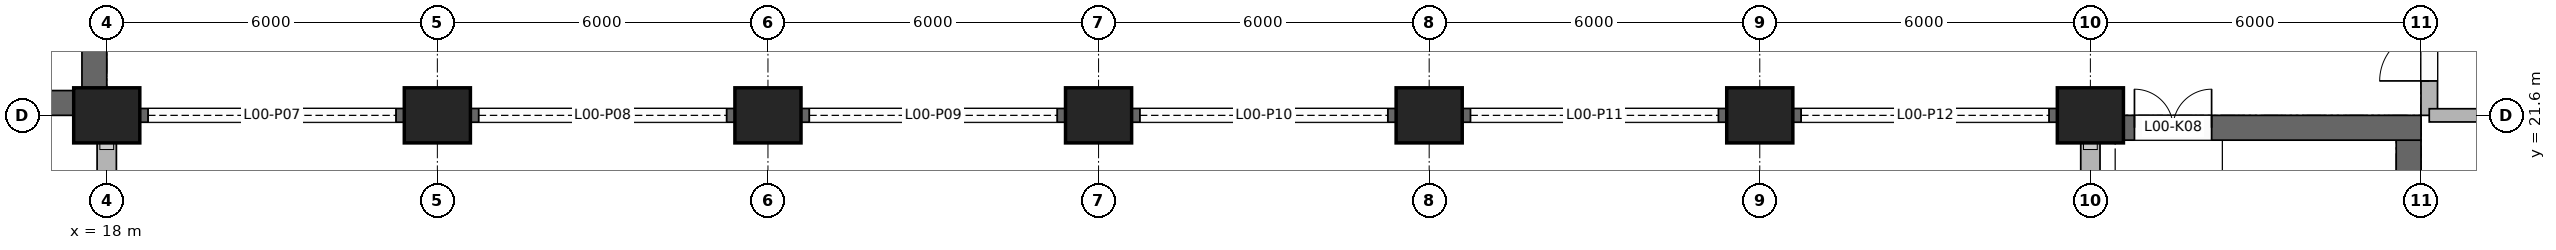
"""IFC4 building model, lengths in metres.
Left out: names, types, materials, properties, quantities, classifications, styles, units other than length and angle.
Written with IfcOpenShell. Run it as: python <this file> out.ifc"""

import sys

from ifc_helpers import new_model, si_unit, direction, frame, frame_2d, origin, origin_2d, place, context, subcontext, project, spatial, rectangle, extrude, element, fill, save


model = new_model("IFC4")
c1 = context("Model", 3, precision=1e-05, world=origin(), true_north=direction((0.0, 1.0)))
c2 = subcontext(c1, "Body", "Model", "MODEL_VIEW")
j1 = project(units=[si_unit("LENGTHUNIT", "METRE"), si_unit("PLANEANGLEUNIT", "RADIAN")], contexts=[c1])
p1 = place(None, origin())
s1 = spatial("IfcSite", under=j1, at=p1, CompositionType="ELEMENT")
p2 = place(p1, origin())
s2 = spatial("IfcBuilding", under=s1, at=p2, CompositionType="ELEMENT")
p3 = place(p2, origin())
s3 = spatial("IfcBuildingStorey", under=s2, at=p3, CompositionType="ELEMENT", Elevation=0.0)
p4 = place(p3, frame((54.6, 21.375, 0.0), z_axis=(0.0, 0.0, 1.0), x_axis=(1.0, 0.0, 0.0)))
e1 = element("IfcWall", 1, at=p4, inside=s3, PredefinedType="SHEAR", context=c2, shape_type="SweptSolid", body=[
    extrude(rectangle(XDim=5.4, YDim=0.45, at=frame_2d((2.7, 0.0))), origin(), (0.0, 0.0, 1.0), 4.0),
])
p5 = place(p4, frame((0.2, 0.0, 0.0)))
e2 = element("IfcOpeningElement", 2, at=p5, cuts=e1, PredefinedType="OPENING", context=c2, shape_type="SweptSolid", body=[
    extrude(rectangle(XDim=1.4, YDim=2.1, at=frame_2d((0.7, 1.05))), frame((0.0, 0.235, 0.0), z_axis=(0.0, -1.0, 0.0), x_axis=(1.0, 0.0, 0.0)), (0.0, 0.0, 1.0), 0.47),
])
p6 = place(p3, frame((59.775, 14.85, 0.0), z_axis=(0.0, 0.0, 1.0), x_axis=(0.0, 1.0, 0.0)))
e3 = element("IfcWall", 3, at=p6, inside=s3, PredefinedType="SHEAR", context=c2, shape_type="SweptSolid", body=[
    extrude(rectangle(XDim=6.3, YDim=0.45, at=frame_2d((3.15, 0.0))), origin(), (0.0, 0.0, 1.0), 4.0),
])
p7 = place(p3, frame((12.0, 21.825, 0.0), z_axis=(0.0, 0.0, 1.0), x_axis=(1.0, 0.0, 0.0)))
e4 = element("IfcWall", 4, at=p7, inside=s3, PredefinedType="SHEAR", context=c2, shape_type="SweptSolid", body=[
    extrude(rectangle(XDim=5.4, YDim=0.45, at=frame_2d((2.7, 0.0))), origin(), (0.0, 0.0, 1.0), 4.0),
])
p8 = place(p7, frame((0.5, 0.0, 0.0)))
e5 = element("IfcOpeningElement", 5, at=p8, cuts=e4, PredefinedType="OPENING", context=c2, shape_type="SweptSolid", body=[
    extrude(rectangle(XDim=1.2, YDim=2.1, at=frame_2d((0.6, 1.05))), frame((0.0, 0.235, 0.0), z_axis=(0.0, -1.0, 0.0), x_axis=(1.0, 0.0, 0.0)), (0.0, 0.0, 1.0), 0.47),
])
p9 = place(p3, frame((17.775, 22.1, 0.0), z_axis=(0.0, 0.0, 1.0), x_axis=(0.0, 1.0, 0.0)))
e6 = element("IfcWall", 6, at=p9, inside=s3, PredefinedType="SHEAR", context=c2, shape_type="SweptSolid", body=[
    extrude(rectangle(XDim=6.25, YDim=0.45, at=frame_2d((3.125, 0.0))), origin(), (0.0, 0.0, 1.0), 4.0),
])
for number, where, z_axis, x_axis in (
    (7, (18.0, 21.6, -0.25), (0.0, 0.0, 1.0), (1.0, 0.0, 0.0)),
    (8, (24.0, 21.6, -0.25), (0.0, 0.0, 1.0), (1.0, 0.0, 0.0)),
    (9, (30.0, 21.6, -0.25), (0.0, 0.0, 1.0), (1.0, 0.0, 0.0)),
    (10, (36.0, 21.6, -0.25), (0.0, 0.0, 1.0), (1.0, 0.0, 0.0)),
    (11, (42.0, 21.6, -0.25), (0.0, 0.0, 1.0), (1.0, 0.0, 0.0)),
    (12, (48.0, 21.6, -0.25), (0.0, 0.0, 1.0), (1.0, 0.0, 0.0)),
    (13, (54.0, 21.6, -0.25), (0.0, 0.0, 1.0), (1.0, 0.0, 0.0)),
):
    element("IfcColumn", number, at=place(p3, frame(where, z_axis=z_axis, x_axis=x_axis)), inside=s3, PredefinedType="COLUMN", context=c2, shape_type="SweptSolid", body=[
        extrude(rectangle(XDim=1.2, YDim=1.0, at=origin_2d()), origin(), (0.0, 0.0, 1.0), 4.45),
    ])
p10 = place(p3, frame((18.0, 14.9, 0.0), z_axis=(0.0, 0.0, 1.0), x_axis=(0.0, 1.0, 0.0)))
e14 = element("IfcWall", 14, at=p10, inside=s3, PredefinedType="SOLIDWALL", context=c2, shape_type="SweptSolid", body=[
    extrude(rectangle(XDim=6.2, YDim=0.35, at=frame_2d((3.1, 0.0))), origin(), (0.0, 0.0, 1.0), 4.2),
])
p11 = place(p10, frame((0.1, 0.0, 0.0)))
e15 = element("IfcOpeningElement", 15, at=p11, cuts=e14, PredefinedType="OPENING", context=c2, shape_type="SweptSolid", body=[
    extrude(rectangle(XDim=1.4, YDim=2.1, at=frame_2d((0.7, 1.05))), frame((0.0, 0.185, 0.0), z_axis=(0.0, -1.0, 0.0), x_axis=(1.0, 0.0, 0.0)), (0.0, 0.0, 1.0), 0.37),
])
p12 = place(p3, frame((54.0, 14.9, 0.0), z_axis=(0.0, 0.0, 1.0), x_axis=(0.0, 1.0, 0.0)))
e16 = element("IfcWall", 16, at=p12, inside=s3, PredefinedType="SOLIDWALL", context=c2, shape_type="SweptSolid", body=[
    extrude(rectangle(XDim=6.2, YDim=0.35, at=frame_2d((3.1, 0.0))), origin(), (0.0, 0.0, 1.0), 4.2),
])
p13 = place(p12, frame((0.1, 0.0, 0.0)))
e17 = element("IfcOpeningElement", 17, at=p13, cuts=e16, PredefinedType="OPENING", context=c2, shape_type="SweptSolid", body=[
    extrude(rectangle(XDim=1.4, YDim=2.1, at=frame_2d((0.7, 1.05))), frame((0.0, 0.185, 0.0), z_axis=(0.0, -1.0, 0.0), x_axis=(1.0, 0.0, 0.0)), (0.0, 0.0, 1.0), 0.37),
])
p14 = place(p3, frame((18.6, 21.6, 0.0), z_axis=(0.0, 0.0, 1.0), x_axis=(1.0, 0.0, 0.0)))
e18 = element("IfcWall", 18, at=p14, inside=s3, PredefinedType="SOLIDWALL", context=c2, shape_type="SweptSolid", body=[
    extrude(rectangle(XDim=4.8, YDim=0.25, at=frame_2d((2.4, 0.0))), origin(), (0.0, 0.0, 1.0), 5.4),
])
p15 = place(p14, frame((0.15, 0.0, 0.0)))
e19 = element("IfcOpeningElement", 19, at=p15, cuts=e18, PredefinedType="OPENING", context=c2, shape_type="SweptSolid", body=[
    extrude(rectangle(XDim=4.5, YDim=4.8, at=frame_2d((2.25, 2.4))), frame((0.0, 0.135, 0.0), z_axis=(0.0, -1.0, 0.0), x_axis=(1.0, 0.0, 0.0)), (0.0, 0.0, 1.0), 0.27),
])
p16 = place(p3, frame((24.6, 21.6, 0.0), z_axis=(0.0, 0.0, 1.0), x_axis=(1.0, 0.0, 0.0)))
e20 = element("IfcWall", 20, at=p16, inside=s3, PredefinedType="SOLIDWALL", context=c2, shape_type="SweptSolid", body=[
    extrude(rectangle(XDim=4.8, YDim=0.25, at=frame_2d((2.4, 0.0))), origin(), (0.0, 0.0, 1.0), 5.4),
])
p17 = place(p16, frame((0.15, 0.0, 0.0)))
e21 = element("IfcOpeningElement", 21, at=p17, cuts=e20, PredefinedType="OPENING", context=c2, shape_type="SweptSolid", body=[
    extrude(rectangle(XDim=4.5, YDim=4.8, at=frame_2d((2.25, 2.4))), frame((0.0, 0.135, 0.0), z_axis=(0.0, -1.0, 0.0), x_axis=(1.0, 0.0, 0.0)), (0.0, 0.0, 1.0), 0.27),
])
p18 = place(p3, frame((30.6, 21.6, 0.0), z_axis=(0.0, 0.0, 1.0), x_axis=(1.0, 0.0, 0.0)))
e22 = element("IfcWall", 22, at=p18, inside=s3, PredefinedType="SOLIDWALL", context=c2, shape_type="SweptSolid", body=[
    extrude(rectangle(XDim=4.8, YDim=0.25, at=frame_2d((2.4, 0.0))), origin(), (0.0, 0.0, 1.0), 5.4),
])
p19 = place(p18, frame((0.15, 0.0, 0.0)))
e23 = element("IfcOpeningElement", 23, at=p19, cuts=e22, PredefinedType="OPENING", context=c2, shape_type="SweptSolid", body=[
    extrude(rectangle(XDim=4.5, YDim=4.8, at=frame_2d((2.25, 2.4))), frame((0.0, 0.135, 0.0), z_axis=(0.0, -1.0, 0.0), x_axis=(1.0, 0.0, 0.0)), (0.0, 0.0, 1.0), 0.27),
])
p20 = place(p3, frame((36.6, 21.6, 0.0), z_axis=(0.0, 0.0, 1.0), x_axis=(1.0, 0.0, 0.0)))
e24 = element("IfcWall", 24, at=p20, inside=s3, PredefinedType="SOLIDWALL", context=c2, shape_type="SweptSolid", body=[
    extrude(rectangle(XDim=4.8, YDim=0.25, at=frame_2d((2.4, 0.0))), origin(), (0.0, 0.0, 1.0), 5.4),
])
p21 = place(p20, frame((0.15, 0.0, 0.0)))
e25 = element("IfcOpeningElement", 25, at=p21, cuts=e24, PredefinedType="OPENING", context=c2, shape_type="SweptSolid", body=[
    extrude(rectangle(XDim=4.5, YDim=4.8, at=frame_2d((2.25, 2.4))), frame((0.0, 0.135, 0.0), z_axis=(0.0, -1.0, 0.0), x_axis=(1.0, 0.0, 0.0)), (0.0, 0.0, 1.0), 0.27),
])
p22 = place(p3, frame((42.6, 21.6, 0.0), z_axis=(0.0, 0.0, 1.0), x_axis=(1.0, 0.0, 0.0)))
e26 = element("IfcWall", 26, at=p22, inside=s3, PredefinedType="SOLIDWALL", context=c2, shape_type="SweptSolid", body=[
    extrude(rectangle(XDim=4.8, YDim=0.25, at=frame_2d((2.4, 0.0))), origin(), (0.0, 0.0, 1.0), 5.4),
])
p23 = place(p22, frame((0.15, 0.0, 0.0)))
e27 = element("IfcOpeningElement", 27, at=p23, cuts=e26, PredefinedType="OPENING", context=c2, shape_type="SweptSolid", body=[
    extrude(rectangle(XDim=4.5, YDim=4.8, at=frame_2d((2.25, 2.4))), frame((0.0, 0.135, 0.0), z_axis=(0.0, -1.0, 0.0), x_axis=(1.0, 0.0, 0.0)), (0.0, 0.0, 1.0), 0.27),
])
p24 = place(p3, frame((48.6, 21.6, 0.0), z_axis=(0.0, 0.0, 1.0), x_axis=(1.0, 0.0, 0.0)))
e28 = element("IfcWall", 28, at=p24, inside=s3, PredefinedType="SOLIDWALL", context=c2, shape_type="SweptSolid", body=[
    extrude(rectangle(XDim=4.8, YDim=0.25, at=frame_2d((2.4, 0.0))), origin(), (0.0, 0.0, 1.0), 5.4),
])
p25 = place(p24, frame((0.15, 0.0, 0.0)))
e29 = element("IfcOpeningElement", 29, at=p25, cuts=e28, PredefinedType="OPENING", context=c2, shape_type="SweptSolid", body=[
    extrude(rectangle(XDim=4.5, YDim=4.8, at=frame_2d((2.25, 2.4))), frame((0.0, 0.135, 0.0), z_axis=(0.0, -1.0, 0.0), x_axis=(1.0, 0.0, 0.0)), (0.0, 0.0, 1.0), 0.27),
])
p26 = place(p3, frame((60.15, 21.6, 0.0), z_axis=(0.0, 0.0, 1.0), x_axis=(0.0, 1.0, 0.0)))
e30 = element("IfcWall", 30, at=p26, inside=s3, PredefinedType="SOLIDWALL", context=c2, shape_type="SweptSolid", body=[
    extrude(rectangle(XDim=6.1, YDim=0.3, at=frame_2d((3.05, 0.0))), origin(), (0.0, 0.0, 1.0), 3.2),
])
p27 = place(p26, frame((0.625, 0.0, 0.0)))
e31 = element("IfcOpeningElement", 31, at=p27, cuts=e30, PredefinedType="OPENING", context=c2, shape_type="SweptSolid", body=[
    extrude(rectangle(XDim=1.8, YDim=2.4, at=frame_2d((0.9, 1.2))), frame((0.0, 0.16, 0.0), z_axis=(0.0, -1.0, 0.0), x_axis=(1.0, 0.0, 0.0)), (0.0, 0.0, 1.0), 0.32),
])
p28 = place(p3, frame((60.15, 21.6, 0.0), z_axis=(0.0, 0.0, 1.0), x_axis=(1.0, 0.0, 0.0)))
e32 = element("IfcWall", 32, at=p28, inside=s3, PredefinedType="PARTITIONING", context=c2, shape_type="SweptSolid", body=[
    extrude(rectangle(XDim=5.45, YDim=0.24, at=frame_2d((2.725, 0.0))), origin(), (0.0, 0.0, 1.0), 3.2),
])
p29 = place(p15, origin())
e33 = element("IfcDoor", 33, at=p29, inside=s3, OperationType="ROLLINGUP", PredefinedType="DOOR", context=c2, shape_type="SweptSolid", body=[
    extrude(rectangle(XDim=4.5, YDim=4.8, at=frame_2d((2.25, 2.4))), frame((0.0, 0.025, 0.0), z_axis=(0.0, -1.0, 0.0), x_axis=(1.0, 0.0, 0.0)), (0.0, 0.0, 1.0), 0.05),
])
fill(e19, e33)
p30 = place(p17, origin())
e34 = element("IfcDoor", 34, at=p30, inside=s3, OperationType="ROLLINGUP", PredefinedType="DOOR", context=c2, shape_type="SweptSolid", body=[
    extrude(rectangle(XDim=4.5, YDim=4.8, at=frame_2d((2.25, 2.4))), frame((0.0, 0.025, 0.0), z_axis=(0.0, -1.0, 0.0), x_axis=(1.0, 0.0, 0.0)), (0.0, 0.0, 1.0), 0.05),
])
fill(e21, e34)
p31 = place(p19, origin())
e35 = element("IfcDoor", 35, at=p31, inside=s3, OperationType="ROLLINGUP", PredefinedType="DOOR", context=c2, shape_type="SweptSolid", body=[
    extrude(rectangle(XDim=4.5, YDim=4.8, at=frame_2d((2.25, 2.4))), frame((0.0, 0.025, 0.0), z_axis=(0.0, -1.0, 0.0), x_axis=(1.0, 0.0, 0.0)), (0.0, 0.0, 1.0), 0.05),
])
fill(e23, e35)
p32 = place(p21, origin())
e36 = element("IfcDoor", 36, at=p32, inside=s3, OperationType="ROLLINGUP", PredefinedType="DOOR", context=c2, shape_type="SweptSolid", body=[
    extrude(rectangle(XDim=4.5, YDim=4.8, at=frame_2d((2.25, 2.4))), frame((0.0, 0.025, 0.0), z_axis=(0.0, -1.0, 0.0), x_axis=(1.0, 0.0, 0.0)), (0.0, 0.0, 1.0), 0.05),
])
fill(e25, e36)
p33 = place(p23, origin())
e37 = element("IfcDoor", 37, at=p33, inside=s3, OperationType="ROLLINGUP", PredefinedType="DOOR", context=c2, shape_type="SweptSolid", body=[
    extrude(rectangle(XDim=4.5, YDim=4.8, at=frame_2d((2.25, 2.4))), frame((0.0, 0.025, 0.0), z_axis=(0.0, -1.0, 0.0), x_axis=(1.0, 0.0, 0.0)), (0.0, 0.0, 1.0), 0.05),
])
fill(e27, e37)
p34 = place(p25, origin())
e38 = element("IfcDoor", 38, at=p34, inside=s3, OperationType="ROLLINGUP", PredefinedType="DOOR", context=c2, shape_type="SweptSolid", body=[
    extrude(rectangle(XDim=4.5, YDim=4.8, at=frame_2d((2.25, 2.4))), frame((0.0, 0.025, 0.0), z_axis=(0.0, -1.0, 0.0), x_axis=(1.0, 0.0, 0.0)), (0.0, 0.0, 1.0), 0.05),
])
fill(e29, e38)
p35 = place(p27, origin())
e39 = element("IfcDoor", 39, at=p35, inside=s3, OperationType="DOUBLE_DOOR_SINGLE_SWING", PredefinedType="DOOR", context=c2, shape_type="SweptSolid", body=[
    extrude(rectangle(XDim=1.8, YDim=2.4, at=frame_2d((0.9, 1.2))), frame((0.0, 0.025, 0.0), z_axis=(0.0, -1.0, 0.0), x_axis=(1.0, 0.0, 0.0)), (0.0, 0.0, 1.0), 0.05),
])
fill(e31, e39)
p36 = place(p5, origin())
e40 = element("IfcDoor", 40, at=p36, inside=s3, OperationType="DOUBLE_DOOR_SINGLE_SWING", PredefinedType="DOOR", context=c2, shape_type="SweptSolid", body=[
    extrude(rectangle(XDim=1.4, YDim=2.1, at=frame_2d((0.7, 1.05))), frame((0.0, 0.025, 0.0), z_axis=(0.0, -1.0, 0.0), x_axis=(1.0, 0.0, 0.0)), (0.0, 0.0, 1.0), 0.05),
])
fill(e2, e40)
save(model, sys.argv[1])
